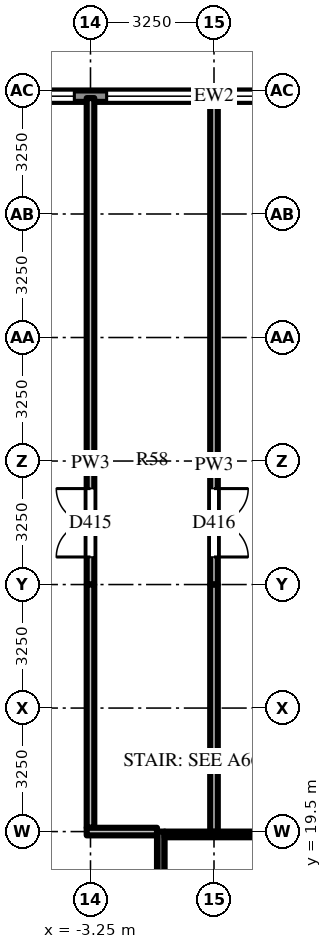
"""IFC4 building model, lengths in metres.
Left out: names, types, materials, properties, quantities, classifications, styles, units other than length and angle.
Written with IfcOpenShell. Run it as: python <this file> out.ifc"""

import sys

from ifc_helpers import new_model, si_unit, direction, frame, frame_2d, origin, place, context, subcontext, project, spatial, rectangle, extrude, source, transform, mapped, element, fill, save


model = new_model("IFC4")
c1 = context("Model", 3, precision=1e-05, world=origin(), true_north=direction((0.0, 1.0)))
c2 = subcontext(c1, "Body", "Model", "MODEL_VIEW")
j1 = project(units=[si_unit("LENGTHUNIT", "METRE"), si_unit("PLANEANGLEUNIT", "RADIAN")], contexts=[c1])
p1 = place(None, origin())
s1 = spatial("IfcSite", under=j1, at=p1, CompositionType="ELEMENT")
p2 = place(p1, origin())
s2 = spatial("IfcBuilding", under=s1, at=p2, CompositionType="ELEMENT")
p3 = place(p2, frame((0.0, 0.0, 14.0)))
s3 = spatial("IfcBuildingStorey", under=s2, at=p3, CompositionType="ELEMENT", Elevation=14.0)
m1 = source(origin(), c2, "Body", "SweptSolid", [
    extrude(rectangle(XDim=6.0, YDim=0.2, at=frame_2d((3.0, 0.0))), origin(), (0.0, 0.0, 1.0), 4.7),
])
p4 = place(p3, frame((-1.4, 13.5, 0.0), z_axis=(0.0, 0.0, 1.0), x_axis=(0.0, 1.0, 0.0)))
e1 = element("IfcWall", 1, at=p4, inside=s3, PredefinedType="SHEAR", context=c2, shape_type="MappedRepresentation", body=[
    mapped(m1, transform((0.0, 0.0, 0.0))),
])
m2 = source(origin(), c2, "Body", "SweptSolid", [
    extrude(rectangle(XDim=2.6, YDim=0.15, at=frame_2d((1.3, 0.0))), origin(), (0.0, 0.0, 1.0), 4.7),
])
p5 = place(p3, frame((-1.3, 19.425, 0.0), z_axis=(0.0, 0.0, 1.0), x_axis=(1.0, 0.0, 0.0)))
e2 = element("IfcWall", 2, at=p5, inside=s3, PredefinedType="SHEAR", context=c2, shape_type="MappedRepresentation", body=[
    mapped(m2, transform((0.0, 0.0, 0.0))),
])
m3 = source(origin(), c2, "Body", "SweptSolid", [
    extrude(rectangle(XDim=71.5, YDim=0.3, at=frame_2d((35.75, 0.0))), origin(), (0.0, 0.0, 1.0), 4.7),
])
p6 = place(p3, frame((35.75, 38.85, 0.0), z_axis=(0.0, 0.0, 1.0), x_axis=(-1.0, 0.0, 0.0)))
e3 = element("IfcWall", 3, at=p6, inside=s3, PredefinedType="SOLIDWALL", context=c2, shape_type="MappedRepresentation", body=[
    mapped(m3, transform((0.0, 0.0, 0.0))),
])
m4 = source(origin(), c2, "Body", "SweptSolid", [
    extrude(rectangle(XDim=2.4, YDim=3.0, at=frame_2d((1.2, 1.5))), frame((0.0, 0.16, 0.0), z_axis=(0.0, -1.0, 0.0), x_axis=(1.0, 0.0, 0.0)), (0.0, 0.0, 1.0), 0.32),
])
p7 = place(p6, frame((0.425, 0.0, 0.9)))
e4 = element("IfcOpeningElement", 4, at=p7, cuts=e3, PredefinedType="OPENING", context=c2, shape_type="MappedRepresentation", body=[
    mapped(m4, transform((0.0, 0.0, 0.0))),
])
p8 = place(p6, frame((3.675, 0.0, 0.9)))
e5 = element("IfcOpeningElement", 5, at=p8, cuts=e3, PredefinedType="OPENING", context=c2, shape_type="MappedRepresentation", body=[
    mapped(m4, transform((0.0, 0.0, 0.0))),
])
p9 = place(p6, frame((6.925, 0.0, 0.9)))
e6 = element("IfcOpeningElement", 6, at=p9, cuts=e3, PredefinedType="OPENING", context=c2, shape_type="MappedRepresentation", body=[
    mapped(m4, transform((0.0, 0.0, 0.0))),
])
p10 = place(p6, frame((10.175, 0.0, 0.9)))
e7 = element("IfcOpeningElement", 7, at=p10, cuts=e3, PredefinedType="OPENING", context=c2, shape_type="MappedRepresentation", body=[
    mapped(m4, transform((0.0, 0.0, 0.0))),
])
m5 = source(origin(), c2, "Body", "SweptSolid", [
    extrude(rectangle(XDim=1.8, YDim=2.4, at=frame_2d((0.9, 1.2))), frame((0.0, 0.16, 0.0), z_axis=(0.0, -1.0, 0.0), x_axis=(1.0, 0.0, 0.0)), (0.0, 0.0, 1.0), 0.32),
])
p11 = place(p6, frame((13.725, 0.0, 0.0)))
e8 = element("IfcOpeningElement", 8, at=p11, cuts=e3, PredefinedType="OPENING", context=c2, shape_type="MappedRepresentation", body=[
    mapped(m5, transform((0.0, 0.0, 0.0))),
])
p12 = place(p6, frame((16.675, 0.0, 0.9)))
e9 = element("IfcOpeningElement", 9, at=p12, cuts=e3, PredefinedType="OPENING", context=c2, shape_type="MappedRepresentation", body=[
    mapped(m4, transform((0.0, 0.0, 0.0))),
])
p13 = place(p6, frame((19.925, 0.0, 0.9)))
e10 = element("IfcOpeningElement", 10, at=p13, cuts=e3, PredefinedType="OPENING", context=c2, shape_type="MappedRepresentation", body=[
    mapped(m4, transform((0.0, 0.0, 0.0))),
])
p14 = place(p6, frame((23.175, 0.0, 0.9)))
e11 = element("IfcOpeningElement", 11, at=p14, cuts=e3, PredefinedType="OPENING", context=c2, shape_type="MappedRepresentation", body=[
    mapped(m4, transform((0.0, 0.0, 0.0))),
])
p15 = place(p6, frame((26.425, 0.0, 0.9)))
e12 = element("IfcOpeningElement", 12, at=p15, cuts=e3, PredefinedType="OPENING", context=c2, shape_type="MappedRepresentation", body=[
    mapped(m4, transform((0.0, 0.0, 0.0))),
])
p16 = place(p6, frame((29.675, 0.0, 0.9)))
e13 = element("IfcOpeningElement", 13, at=p16, cuts=e3, PredefinedType="OPENING", context=c2, shape_type="MappedRepresentation", body=[
    mapped(m4, transform((0.0, 0.0, 0.0))),
])
p17 = place(p6, frame((32.925, 0.0, 0.9)))
e14 = element("IfcOpeningElement", 14, at=p17, cuts=e3, PredefinedType="OPENING", context=c2, shape_type="MappedRepresentation", body=[
    mapped(m4, transform((0.0, 0.0, 0.0))),
])
p18 = place(p6, frame((36.175, 0.0, 0.9)))
e15 = element("IfcOpeningElement", 15, at=p18, cuts=e3, PredefinedType="OPENING", context=c2, shape_type="MappedRepresentation", body=[
    mapped(m4, transform((0.0, 0.0, 0.0))),
])
p19 = place(p6, frame((39.425, 0.0, 0.9)))
e16 = element("IfcOpeningElement", 16, at=p19, cuts=e3, PredefinedType="OPENING", context=c2, shape_type="MappedRepresentation", body=[
    mapped(m4, transform((0.0, 0.0, 0.0))),
])
p20 = place(p6, frame((42.675, 0.0, 0.9)))
e17 = element("IfcOpeningElement", 17, at=p20, cuts=e3, PredefinedType="OPENING", context=c2, shape_type="MappedRepresentation", body=[
    mapped(m4, transform((0.0, 0.0, 0.0))),
])
p21 = place(p6, frame((45.925, 0.0, 0.9)))
e18 = element("IfcOpeningElement", 18, at=p21, cuts=e3, PredefinedType="OPENING", context=c2, shape_type="MappedRepresentation", body=[
    mapped(m4, transform((0.0, 0.0, 0.0))),
])
p22 = place(p6, frame((49.175, 0.0, 0.9)))
e19 = element("IfcOpeningElement", 19, at=p22, cuts=e3, PredefinedType="OPENING", context=c2, shape_type="MappedRepresentation", body=[
    mapped(m4, transform((0.0, 0.0, 0.0))),
])
p23 = place(p6, frame((52.425, 0.0, 0.9)))
e20 = element("IfcOpeningElement", 20, at=p23, cuts=e3, PredefinedType="OPENING", context=c2, shape_type="MappedRepresentation", body=[
    mapped(m4, transform((0.0, 0.0, 0.0))),
])
p24 = place(p6, frame((55.675, 0.0, 0.9)))
e21 = element("IfcOpeningElement", 21, at=p24, cuts=e3, PredefinedType="OPENING", context=c2, shape_type="MappedRepresentation", body=[
    mapped(m4, transform((0.0, 0.0, 0.0))),
])
p25 = place(p6, frame((58.925, 0.0, 0.9)))
e22 = element("IfcOpeningElement", 22, at=p25, cuts=e3, PredefinedType="OPENING", context=c2, shape_type="MappedRepresentation", body=[
    mapped(m4, transform((0.0, 0.0, 0.0))),
])
p26 = place(p6, frame((62.175, 0.0, 0.9)))
e23 = element("IfcOpeningElement", 23, at=p26, cuts=e3, PredefinedType="OPENING", context=c2, shape_type="MappedRepresentation", body=[
    mapped(m4, transform((0.0, 0.0, 0.0))),
])
p27 = place(p6, frame((65.425, 0.0, 0.9)))
e24 = element("IfcOpeningElement", 24, at=p27, cuts=e3, PredefinedType="OPENING", context=c2, shape_type="MappedRepresentation", body=[
    mapped(m4, transform((0.0, 0.0, 0.0))),
])
p28 = place(p6, frame((68.675, 0.0, 0.9)))
e25 = element("IfcOpeningElement", 25, at=p28, cuts=e3, PredefinedType="OPENING", context=c2, shape_type="MappedRepresentation", body=[
    mapped(m4, transform((0.0, 0.0, 0.0))),
])
m6 = source(origin(), c2, "Body", "SweptSolid", [
    extrude(rectangle(XDim=3.25, YDim=0.2, at=frame_2d((1.625, 0.0))), origin(), (0.0, 0.0, 1.0), 4.7),
])
p29 = place(p3, frame((-3.25, 26.0, 0.0), z_axis=(0.0, 0.0, 1.0), x_axis=(0.0, 1.0, 0.0)))
e26 = element("IfcWall", 26, at=p29, inside=s3, PredefinedType="PARTITIONING", context=c2, shape_type="MappedRepresentation", body=[
    mapped(m6, transform((0.0, 0.0, 0.0))),
])
m7 = source(origin(), c2, "Body", "SweptSolid", [
    extrude(rectangle(XDim=1.8, YDim=2.1, at=frame_2d((0.9, 1.05))), frame((0.0, 0.11, 0.0), z_axis=(0.0, -1.0, 0.0), x_axis=(1.0, 0.0, 0.0)), (0.0, 0.0, 1.0), 0.22),
])
p30 = place(p29, frame((0.725, 0.0, 0.0)))
e27 = element("IfcOpeningElement", 27, at=p30, cuts=e26, PredefinedType="OPENING", context=c2, shape_type="MappedRepresentation", body=[
    mapped(m7, transform((0.0, 0.0, 0.0))),
])
m8 = source(origin(), c2, "Body", "SweptSolid", [
    extrude(rectangle(XDim=6.4, YDim=0.2, at=frame_2d((3.2, 0.0))), origin(), (0.0, 0.0, 1.0), 4.7),
])
p31 = place(p3, frame((-3.25, 26.0, 0.0), z_axis=(0.0, 0.0, 1.0), x_axis=(0.0, -1.0, 0.0)))
e28 = element("IfcWall", 28, at=p31, inside=s3, PredefinedType="PARTITIONING", context=c2, shape_type="MappedRepresentation", body=[
    mapped(m8, transform((0.0, 0.0, 0.0))),
])
m9 = source(origin(), c2, "Body", "SweptSolid", [
    extrude(rectangle(XDim=9.55, YDim=0.2, at=frame_2d((4.775, 0.0))), origin(), (0.0, 0.0, 1.0), 3.918),
])
p32 = place(p3, frame((-3.25, 29.25, 0.0), z_axis=(0.0, 0.0, 1.0), x_axis=(0.0, 1.0, 0.0)))
e29 = element("IfcWall", 29, at=p32, inside=s3, PredefinedType="PARTITIONING", context=c2, shape_type="MappedRepresentation", body=[
    mapped(m9, transform((0.0, 0.0, 0.0))),
])
m10 = source(origin(), c2, "Body", "SweptSolid", [
    extrude(rectangle(XDim=3.25, YDim=0.2, at=frame_2d((1.625, 0.0))), origin(), (0.0, 0.0, 1.0), 3.996),
])
p33 = place(p3, frame((0.0, 29.25, 0.0), z_axis=(0.0, 0.0, 1.0), x_axis=(0.0, -1.0, 0.0)))
e30 = element("IfcWall", 30, at=p33, inside=s3, PredefinedType="PARTITIONING", context=c2, shape_type="MappedRepresentation", body=[
    mapped(m10, transform((0.0, 0.0, 0.0))),
])
p34 = place(p33, frame((0.725, 0.0, 0.0)))
e31 = element("IfcOpeningElement", 31, at=p34, cuts=e30, PredefinedType="OPENING", context=c2, shape_type="MappedRepresentation", body=[
    mapped(m7, transform((0.0, 0.0, 0.0))),
])
m11 = source(origin(), c2, "Body", "SweptSolid", [
    extrude(rectangle(XDim=6.5, YDim=0.2, at=frame_2d((3.25, 0.0))), origin(), (0.0, 0.0, 1.0), 3.996),
])
p35 = place(p3, frame((0.0, 26.0, 0.0), z_axis=(0.0, 0.0, 1.0), x_axis=(0.0, -1.0, 0.0)))
e32 = element("IfcWall", 32, at=p35, inside=s3, PredefinedType="PARTITIONING", context=c2, shape_type="MappedRepresentation", body=[
    mapped(m11, transform((0.0, 0.0, 0.0))),
])
p36 = place(p3, frame((0.0, 38.8, 0.0), z_axis=(0.0, 0.0, 1.0), x_axis=(0.0, -1.0, 0.0)))
e33 = element("IfcWall", 33, at=p36, inside=s3, PredefinedType="PARTITIONING", context=c2, shape_type="MappedRepresentation", body=[
    mapped(m9, transform((0.0, 0.0, 0.0))),
])
m12 = source(origin(), c2, "Body", "SweptSolid", [
    extrude(rectangle(XDim=1.85, YDim=0.2, at=frame_2d((0.925, 0.0))), origin(), (0.0, 0.0, 1.0), 3.996),
])
p37 = place(p3, frame((-1.5, 19.5, 0.0), z_axis=(0.0, 0.0, 1.0), x_axis=(-1.0, 0.0, 0.0)))
e34 = element("IfcWall", 34, at=p37, inside=s3, PredefinedType="PARTITIONING", context=c2, shape_type="MappedRepresentation", body=[
    mapped(m12, transform((0.0, 0.0, 0.0))),
])
m13 = source(origin(), c2, "Body", "SweptSolid", [
    extrude(rectangle(XDim=2.4, YDim=3.0, at=frame_2d((1.2, 1.5))), frame((0.0, 0.03, 0.0), z_axis=(0.0, -1.0, 0.0), x_axis=(1.0, 0.0, 0.0)), (0.0, 0.0, 1.0), 0.06),
])
p38 = place(p17, origin())
e35 = element("IfcWindow", 35, at=p38, inside=s3, PartitioningType="SINGLE_PANEL", PredefinedType="WINDOW", context=c2, shape_type="MappedRepresentation", body=[
    mapped(m13, transform((0.0, 0.0, 0.0))),
])
fill(e14, e35)
p39 = place(p18, origin())
e36 = element("IfcWindow", 36, at=p39, inside=s3, PartitioningType="SINGLE_PANEL", PredefinedType="WINDOW", context=c2, shape_type="MappedRepresentation", body=[
    mapped(m13, transform((0.0, 0.0, 0.0))),
])
fill(e15, e36)
p40 = place(p19, origin())
e37 = element("IfcWindow", 37, at=p40, inside=s3, PartitioningType="SINGLE_PANEL", PredefinedType="WINDOW", context=c2, shape_type="MappedRepresentation", body=[
    mapped(m13, transform((0.0, 0.0, 0.0))),
])
fill(e16, e37)
m14 = source(origin(), c2, "Body", "SweptSolid", [
    extrude(rectangle(XDim=1.8, YDim=2.1, at=frame_2d((0.9, 1.05))), frame((0.0, 0.025, 0.0), z_axis=(0.0, -1.0, 0.0), x_axis=(1.0, 0.0, 0.0)), (0.0, 0.0, 1.0), 0.05),
])
p41 = place(p30, origin())
e38 = element("IfcDoor", 38, at=p41, inside=s3, OperationType="DOUBLE_DOOR_SINGLE_SWING", PredefinedType="DOOR", context=c2, shape_type="MappedRepresentation", body=[
    mapped(m14, transform((0.0, 0.0, 0.0))),
])
fill(e27, e38)
p42 = place(p34, origin())
e39 = element("IfcDoor", 39, at=p42, inside=s3, OperationType="DOUBLE_DOOR_SINGLE_SWING", PredefinedType="DOOR", context=c2, shape_type="MappedRepresentation", body=[
    mapped(m14, transform((0.0, 0.0, 0.0))),
])
fill(e31, e39)
save(model, sys.argv[1])
